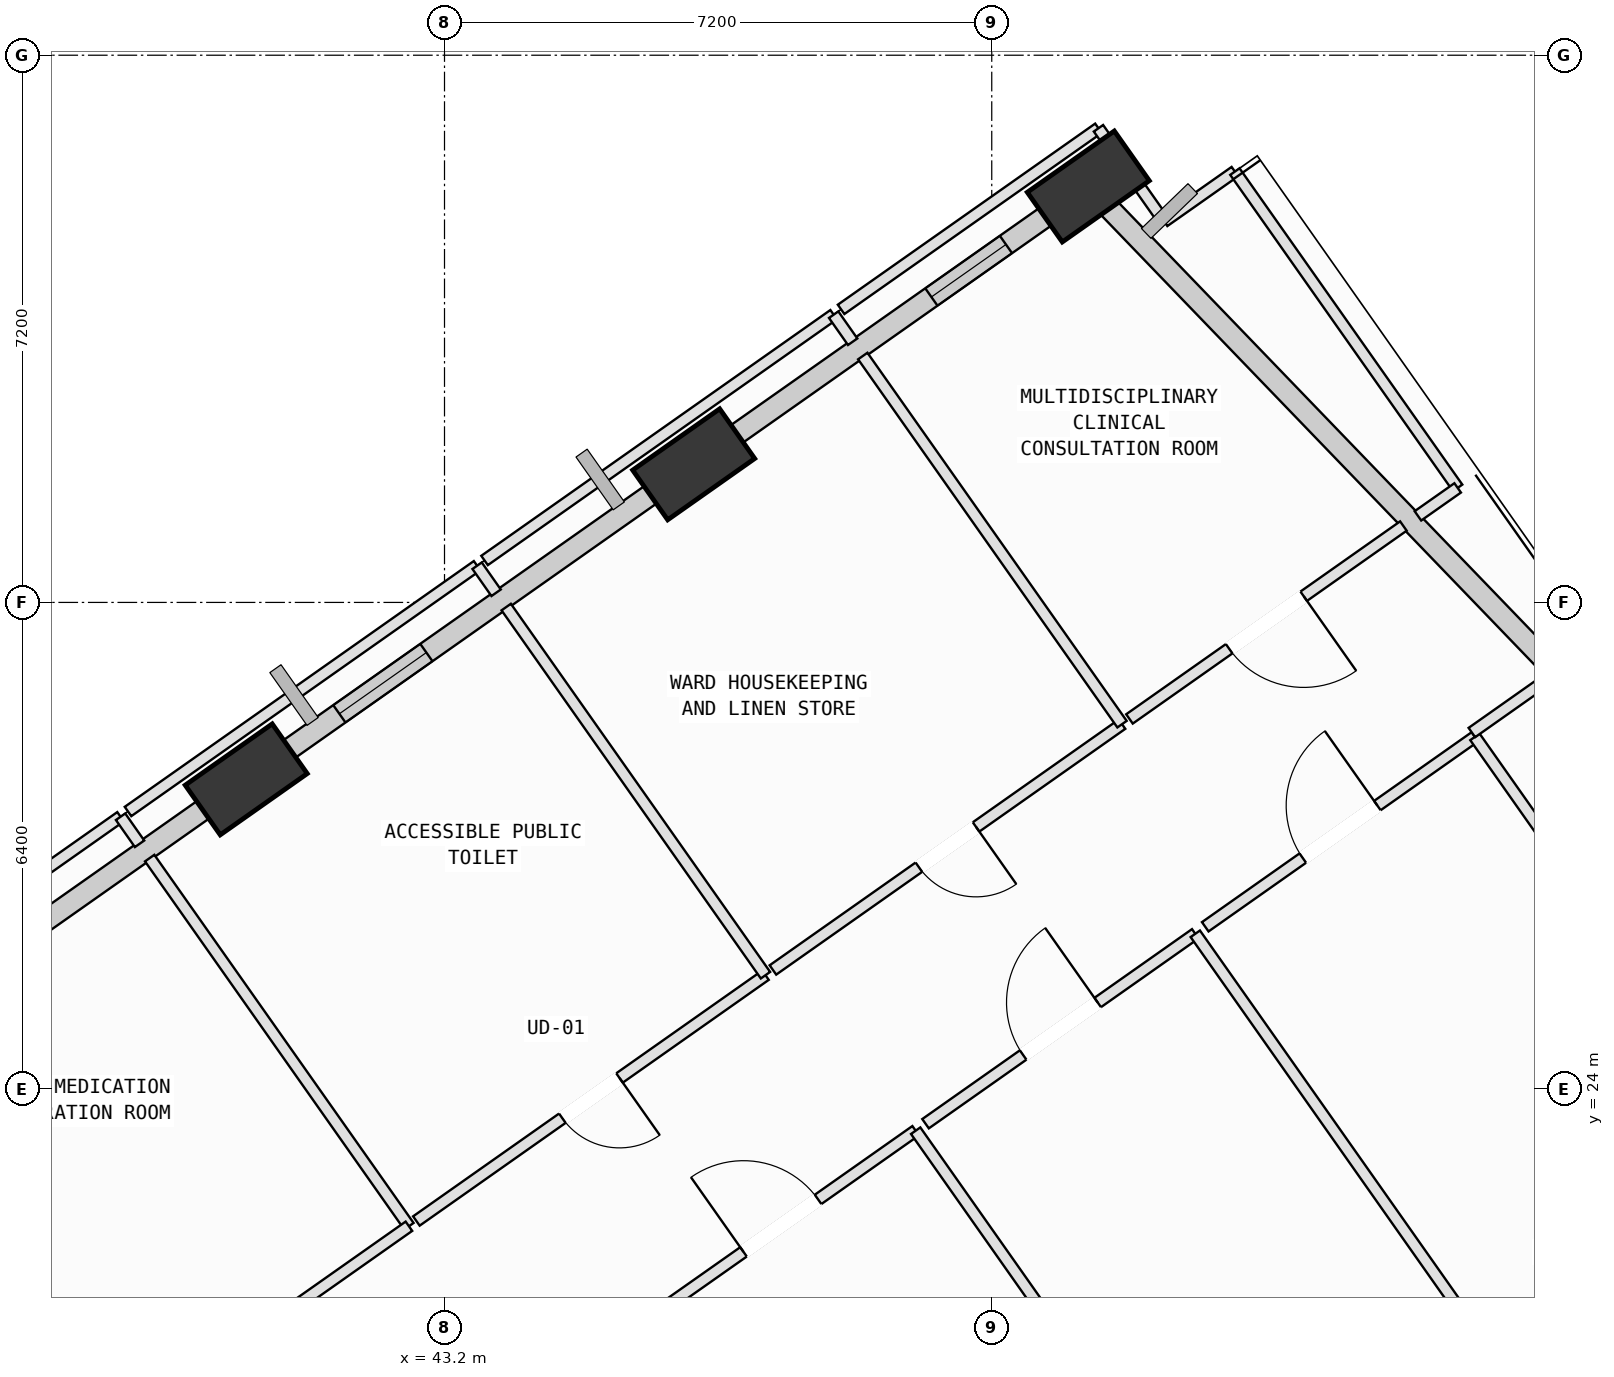
"""IFC4 building model, lengths in metres.
Left out: names, types, materials, properties, quantities, classifications, styles, units other than length and angle.
Written with IfcOpenShell. Run it as: python <this file> out.ifc"""

import sys

from ifc_helpers import new_model, si_unit, direction, frame, frame_2d, origin, origin_2d, place, context, subcontext, project, spatial, rectangle, extrude, element, fill, save


model = new_model("IFC4")
c1 = context("Model", 3, precision=1e-05, world=origin(), true_north=direction((0.0, 1.0)))
c2 = subcontext(c1, "Body", "Model", "MODEL_VIEW")
j1 = project(units=[si_unit("LENGTHUNIT", "METRE"), si_unit("PLANEANGLEUNIT", "RADIAN")], contexts=[c1])
p1 = place(None, origin())
s1 = spatial("IfcSite", under=j1, at=p1, CompositionType="ELEMENT")
p2 = place(p1, origin())
s2 = spatial("IfcBuilding", under=s1, at=p2, CompositionType="ELEMENT")
p3 = place(p2, frame((0.0, 0.0, 173.8)))
s3 = spatial("IfcBuildingStorey", under=s2, at=p3, CompositionType="ELEMENT", Elevation=173.8)
p4 = place(p3, frame((51.67, 35.873, 0.002), z_axis=(-0.046372709231, 0.074245020029, 0.996161256444), x_axis=(-0.389675727711, -0.919572177805, 0.05039679592)))
e1 = element("IfcColumn", 1, at=p4, inside=s3, PredefinedType="COLUMN", context=c2, shape_type="SweptSolid", body=[
    extrude(rectangle(XDim=1.4, YDim=0.8, at=origin_2d()), origin(), (0.0, 0.0, 1.0), 4.012),
])
p5 = place(p3, frame((46.478, 32.217, 0.002), z_axis=(-0.031097493858, 0.053048665992, 0.998107601871), x_axis=(-0.414781591136, -0.90923206001, 0.035401874319)))
e2 = element("IfcColumn", 2, at=p5, inside=s3, PredefinedType="COLUMN", context=c2, shape_type="SweptSolid", body=[
    extrude(rectangle(XDim=1.4, YDim=0.8, at=origin_2d()), origin(), (0.0, 0.0, 1.0), 4.004),
])
p6 = place(p3, frame((40.591, 28.072, 0.002), z_axis=(-0.013799535315, 0.028820268446, 0.999489352095), x_axis=(-0.488965468419, -0.872109136637, 0.018396317223)))
e3 = element("IfcColumn", 3, at=p6, inside=s3, PredefinedType="COLUMN", context=c2, shape_type="SweptSolid", body=[
    extrude(rectangle(XDim=1.4, YDim=0.8, at=origin_2d()), origin(), (0.0, 0.0, 1.0), 3.998),
])
p7 = place(p3, frame((51.895, 35.64, 0.0), z_axis=(0.0, 0.0, 1.0), x_axis=(0.693919284299, -0.720052794508, 0.0)))
e4 = element("IfcWall", 4, at=p7, inside=s3, PredefinedType="SOLIDWALL", context=c2, shape_type="SweptSolid", body=[
    extrude(rectangle(XDim=8.838, YDim=0.28, at=frame_2d((4.419, 0.0))), origin(), (0.0, 0.0, 1.0), 3.265),
])
p8 = place(p3, frame((46.88, 32.5, 0.0), z_axis=(0.0, 0.0, 1.0), x_axis=(0.817637087574, 0.575733960283, 0.0)))
e5 = element("IfcWall", 5, at=p8, inside=s3, PredefinedType="SOLIDWALL", context=c2, shape_type="SweptSolid", body=[
    extrude(rectangle(XDim=5.405, YDim=0.28, at=frame_2d((2.702, 0.0))), origin(), (0.0, 0.0, 1.0), 3.265),
])
p9 = place(p8, frame((3.334, 0.0, 0.75)))
e6 = element("IfcOpeningElement", 6, at=p9, cuts=e5, PredefinedType="OPENING", context=c2, shape_type="SweptSolid", body=[
    extrude(rectangle(XDim=1.2, YDim=1.75, at=frame_2d((0.6, 0.875))), frame((0.0, 0.15, 0.0), z_axis=(0.0, -1.0, 0.0), x_axis=(1.0, 0.0, 0.0)), (0.0, 0.0, 1.0), 0.3),
])
p10 = place(p3, frame((41.002, 28.361, 0.0), z_axis=(0.0, 0.0, 1.0), x_axis=(0.817646454024, 0.575720658151, 0.0)))
e7 = element("IfcWall", 7, at=p10, inside=s3, PredefinedType="SOLIDWALL", context=c2, shape_type="SweptSolid", body=[
    extrude(rectangle(XDim=6.227, YDim=0.28, at=frame_2d((3.113, 0.0))), origin(), (0.0, 0.0, 1.0), 3.065),
])
p11 = place(p10, frame((0.996, 0.0, 0.75)))
e8 = element("IfcOpeningElement", 8, at=p11, cuts=e7, PredefinedType="OPENING", context=c2, shape_type="SweptSolid", body=[
    extrude(rectangle(XDim=1.4, YDim=1.85, at=frame_2d((0.7, 0.925))), frame((0.0, 0.15, 0.0), z_axis=(0.0, -1.0, 0.0), x_axis=(1.0, 0.0, 0.0)), (0.0, 0.0, 1.0), 0.3),
])
p12 = place(p3, frame((35.119, 24.219, 0.0), z_axis=(0.0, 0.0, 1.0), x_axis=(0.817635088969, 0.575736798622, 0.0)))
e9 = element("IfcWall", 9, at=p12, inside=s3, PredefinedType="SOLIDWALL", context=c2, shape_type="SweptSolid", body=[
    extrude(rectangle(XDim=6.211, YDim=0.28, at=frame_2d((3.105, 0.0))), origin(), (0.0, 0.0, 1.0), 3.265),
])
p13 = place(p12, frame((1.524, 0.0, 0.75)))
e10 = element("IfcOpeningElement", 10, at=p13, cuts=e9, PredefinedType="OPENING", context=c2, shape_type="SweptSolid", body=[
    extrude(rectangle(XDim=1.8, YDim=2.05, at=frame_2d((0.9, 1.025))), frame((0.0, 0.15, 0.0), z_axis=(0.0, -1.0, 0.0), x_axis=(1.0, 0.0, 0.0)), (0.0, 0.0, 1.0), 0.3),
])
p14 = place(p3, frame((45.85, 20.951, 0.0), z_axis=(0.0, 0.0, 1.0), x_axis=(0.817727963856, 0.575604879346, 0.0)))
e11 = element("IfcWall", 11, at=p14, inside=s3, PredefinedType="PARTITIONING", context=c2, shape_type="SweptSolid", body=[
    extrude(rectangle(XDim=4.34, YDim=0.15, at=frame_2d((2.17, 0.0))), origin(), (0.0, 0.0, 1.0), 3.78),
])
p15 = place(p14, frame((1.57, 0.0, 0.0)))
e12 = element("IfcOpeningElement", 12, at=p15, cuts=e11, PredefinedType="OPENING", context=c2, shape_type="SweptSolid", body=[
    extrude(rectangle(XDim=1.2, YDim=2.15, at=frame_2d((0.6, 1.075))), frame((0.0, 0.085, 0.0), z_axis=(0.0, -1.0, 0.0), x_axis=(1.0, 0.0, 0.0)), (0.0, 0.0, 1.0), 0.17),
])
p16 = place(p3, frame((49.399, 23.449, 0.0), z_axis=(0.0, 0.0, 1.0), x_axis=(0.575704672979, -0.817657709259, 0.0)))
e13 = element("IfcWall", 13, at=p16, inside=s3, PredefinedType="PARTITIONING", context=c2, shape_type="SweptSolid", body=[
    extrude(rectangle(XDim=12.279, YDim=0.15, at=frame_2d((6.14, 0.0))), origin(), (0.0, 0.0, 1.0), 3.78),
])
p17 = place(p3, frame((49.529, 23.541, 0.0), z_axis=(0.0, 0.0, 1.0), x_axis=(0.81762204879, 0.575755317241, 0.0)))
e14 = element("IfcWall", 14, at=p17, inside=s3, PredefinedType="PARTITIONING", context=c2, shape_type="SweptSolid", body=[
    extrude(rectangle(XDim=4.34, YDim=0.15, at=frame_2d((2.17, 0.0))), origin(), (0.0, 0.0, 1.0), 3.065),
])
p18 = place(p17, frame((1.57, 0.0, 0.0)))
e15 = element("IfcOpeningElement", 15, at=p18, cuts=e14, PredefinedType="OPENING", context=c2, shape_type="SweptSolid", body=[
    extrude(rectangle(XDim=1.2, YDim=2.15, at=frame_2d((0.6, 1.075))), frame((0.0, 0.085, 0.0), z_axis=(0.0, -1.0, 0.0), x_axis=(1.0, 0.0, 0.0)), (0.0, 0.0, 1.0), 0.17),
])
p19 = place(p3, frame((53.078, 26.04, 0.0), z_axis=(0.0, 0.0, 1.0), x_axis=(0.575696572392, -0.817663412742, 0.0)))
e16 = element("IfcWall", 16, at=p19, inside=s3, PredefinedType="PARTITIONING", context=c2, shape_type="SweptSolid", body=[
    extrude(rectangle(XDim=11.935, YDim=0.15, at=frame_2d((5.968, 0.0))), origin(), (0.0, 0.0, 1.0), 3.78),
])
p20 = place(p3, frame((53.209, 26.132, 0.0), z_axis=(0.0, 0.0, 1.0), x_axis=(0.817566099481, 0.575834761872, 0.0)))
e17 = element("IfcWall", 17, at=p20, inside=s3, PredefinedType="PARTITIONING", context=c2, shape_type="SweptSolid", body=[
    extrude(rectangle(XDim=4.34, YDim=0.15, at=frame_2d((2.17, 0.0))), origin(), (0.0, 0.0, 1.0), 3.065),
])
p21 = place(p20, frame((1.57, 0.0, 0.0)))
e18 = element("IfcOpeningElement", 18, at=p21, cuts=e17, PredefinedType="OPENING", context=c2, shape_type="SweptSolid", body=[
    extrude(rectangle(XDim=1.2, YDim=2.15, at=frame_2d((0.6, 1.075))), frame((0.0, 0.085, 0.0), z_axis=(0.0, -1.0, 0.0), x_axis=(1.0, 0.0, 0.0)), (0.0, 0.0, 1.0), 0.17),
])
p22 = place(p3, frame((56.757, 28.631, 0.0), z_axis=(0.0, 0.0, 1.0), x_axis=(0.575730217861, -0.817639722764, 0.0)))
e19 = element("IfcWall", 19, at=p22, inside=s3, PredefinedType="PARTITIONING", context=c2, shape_type="SweptSolid", body=[
    extrude(rectangle(XDim=9.831, YDim=0.15, at=frame_2d((4.916, 0.0))), origin(), (0.0, 0.0, 1.0), 3.78),
])
p23 = place(p22, frame((4.485, 0.0, 0.0)))
e20 = element("IfcOpeningElement", 20, at=p23, cuts=e19, PredefinedType="OPENING", context=c2, shape_type="SweptSolid", body=[
    extrude(rectangle(XDim=0.86, YDim=2.06, at=frame_2d((0.43, 1.03))), frame((0.0, 0.085, 0.0), z_axis=(0.0, -1.0, 0.0), x_axis=(1.0, 0.0, 0.0)), (0.0, 0.0, 1.0), 0.17),
])
p24 = place(p3, frame((34.345, 24.346, 0.0), z_axis=(0.0, 0.0, 1.0), x_axis=(0.817638200952, 0.5757323791, 0.0)))
e21 = element("IfcWall", 21, at=p24, inside=s3, PredefinedType="PARTITIONING", context=c2, shape_type="SweptSolid", body=[
    extrude(rectangle(XDim=5.617, YDim=0.15, at=frame_2d((2.809, 0.0))), origin(), (0.0, 0.0, 1.0), 3.78),
])
p25 = place(p3, frame((38.938, 27.58, 0.0), z_axis=(0.0, 0.0, 1.0), x_axis=(0.574742398175, -0.818334391151, 0.0)))
e22 = element("IfcWall", 22, at=p25, inside=s3, PredefinedType="PARTITIONING", context=c2, shape_type="SweptSolid", body=[
    extrude(rectangle(XDim=0.435, YDim=0.15, at=frame_2d((0.218, 0.0))), origin(), (0.0, 0.0, 1.0), 3.78),
])
p26 = place(p3, frame((39.321, 27.036, 0.0), z_axis=(0.0, 0.0, 1.0), x_axis=(0.575736327122, -0.817635420974, 0.0)))
e23 = element("IfcWall", 23, at=p26, inside=s3, PredefinedType="PARTITIONING", context=c2, shape_type="SweptSolid", body=[
    extrude(rectangle(XDim=5.924, YDim=0.15, at=frame_2d((2.962, 0.0))), origin(), (0.0, 0.0, 1.0), 3.78),
])
p27 = place(p3, frame((42.732, 22.192, 0.0), z_axis=(0.0, 0.0, 1.0), x_axis=(-0.81760379004, -0.575781245363, 0.0)))
e24 = element("IfcWall", 24, at=p27, inside=s3, PredefinedType="PARTITIONING", context=c2, shape_type="SweptSolid", body=[
    extrude(rectangle(XDim=2.626, YDim=0.15, at=frame_2d((1.313, 0.0))), origin(), (0.0, 0.0, 1.0), 3.78),
])
p28 = place(p3, frame((47.423, 25.495, 0.0), z_axis=(0.0, 0.0, 1.0), x_axis=(-0.817638200952, -0.5757323791, 0.0)))
e25 = element("IfcWall", 25, at=p28, inside=s3, PredefinedType="PARTITIONING", context=c2, shape_type="SweptSolid", body=[
    extrude(rectangle(XDim=5.617, YDim=0.15, at=frame_2d((2.809, 0.0))), origin(), (0.0, 0.0, 1.0), 3.78),
])
p29 = place(p28, frame((2.349, 0.0, 0.0)))
e26 = element("IfcOpeningElement", 26, at=p29, cuts=e25, PredefinedType="OPENING", context=c2, shape_type="SweptSolid", body=[
    extrude(rectangle(XDim=0.92, YDim=2.1, at=frame_2d((0.46, 1.05))), frame((0.0, 0.085, 0.0), z_axis=(0.0, -1.0, 0.0), x_axis=(1.0, 0.0, 0.0)), (0.0, 0.0, 1.0), 0.17),
])
p30 = place(p3, frame((39.036, 27.649, 0.0), z_axis=(0.0, 0.0, 1.0), x_axis=(0.817638200952, 0.5757323791, 0.0)))
e27 = element("IfcWall", 27, at=p30, inside=s3, PredefinedType="PARTITIONING", context=c2, shape_type="SweptSolid", body=[
    extrude(rectangle(XDim=5.617, YDim=0.15, at=frame_2d((2.809, 0.0))), origin(), (0.0, 0.0, 1.0), 3.265),
])
p31 = place(p3, frame((43.629, 30.883, 0.0), z_axis=(0.0, 0.0, 1.0), x_axis=(0.574742398175, -0.818334391151, 0.0)))
e28 = element("IfcWall", 28, at=p31, inside=s3, PredefinedType="PARTITIONING", context=c2, shape_type="SweptSolid", body=[
    extrude(rectangle(XDim=0.435, YDim=0.15, at=frame_2d((0.218, 0.0))), origin(), (0.0, 0.0, 1.0), 3.78),
])
p32 = place(p3, frame((44.012, 30.339, 0.0), z_axis=(0.0, 0.0, 1.0), x_axis=(0.575763875757, -0.817616021965, 0.0)))
e29 = element("IfcWall", 29, at=p32, inside=s3, PredefinedType="PARTITIONING", context=c2, shape_type="SweptSolid", body=[
    extrude(rectangle(XDim=5.925, YDim=0.15, at=frame_2d((2.962, 0.0))), origin(), (0.0, 0.0, 1.0), 3.78),
])
p33 = place(p3, frame((52.114, 28.798, 0.0), z_axis=(0.0, 0.0, 1.0), x_axis=(-0.817638200952, -0.5757323791, 0.0)))
e30 = element("IfcWall", 30, at=p33, inside=s3, PredefinedType="PARTITIONING", context=c2, shape_type="SweptSolid", body=[
    extrude(rectangle(XDim=5.617, YDim=0.15, at=frame_2d((2.809, 0.0))), origin(), (0.0, 0.0, 1.0), 3.78),
])
p34 = place(p33, frame((2.349, 0.0, 0.0)))
e31 = element("IfcOpeningElement", 31, at=p34, cuts=e30, PredefinedType="OPENING", context=c2, shape_type="SweptSolid", body=[
    extrude(rectangle(XDim=0.92, YDim=2.1, at=frame_2d((0.46, 1.05))), frame((0.0, 0.085, 0.0), z_axis=(0.0, -1.0, 0.0), x_axis=(1.0, 0.0, 0.0)), (0.0, 0.0, 1.0), 0.17),
])
p35 = place(p3, frame((43.727, 30.952, 0.0), z_axis=(0.0, 0.0, 1.0), x_axis=(0.817638200952, 0.5757323791, 0.0)))
e32 = element("IfcWall", 32, at=p35, inside=s3, PredefinedType="PARTITIONING", context=c2, shape_type="SweptSolid", body=[
    extrude(rectangle(XDim=5.617, YDim=0.15, at=frame_2d((2.809, 0.0))), origin(), (0.0, 0.0, 1.0), 3.065),
])
p36 = place(p3, frame((48.32, 34.186, 0.0), z_axis=(0.0, 0.0, 1.0), x_axis=(0.574742398175, -0.818334391151, 0.0)))
e33 = element("IfcWall", 33, at=p36, inside=s3, PredefinedType="PARTITIONING", context=c2, shape_type="SweptSolid", body=[
    extrude(rectangle(XDim=0.435, YDim=0.15, at=frame_2d((0.218, 0.0))), origin(), (0.0, 0.0, 1.0), 3.78),
])
p37 = place(p3, frame((48.703, 33.642, 0.0), z_axis=(0.0, 0.0, 1.0), x_axis=(0.575763875757, -0.817616021965, 0.0)))
e34 = element("IfcWall", 34, at=p37, inside=s3, PredefinedType="PARTITIONING", context=c2, shape_type="SweptSolid", body=[
    extrude(rectangle(XDim=5.925, YDim=0.15, at=frame_2d((2.962, 0.0))), origin(), (0.0, 0.0, 1.0), 3.78),
])
p38 = place(p3, frame((52.667, 35.413, 0.0), z_axis=(0.0, 0.0, 1.0), x_axis=(0.817780283256, 0.575530545078, 0.0)))
e35 = element("IfcWall", 35, at=p38, inside=s3, PredefinedType="PARTITIONING", context=c2, shape_type="SweptSolid", body=[
    extrude(rectangle(XDim=1.14, YDim=0.15, at=frame_2d((0.57, 0.0))), origin(), (0.0, 0.0, 1.0), 3.78),
])
p39 = place(p3, frame((53.599, 36.069, 0.0), z_axis=(0.0, 0.0, 1.0), x_axis=(0.575758299288, -0.817619948877, 0.0)))
e36 = element("IfcWall", 36, at=p39, inside=s3, PredefinedType="PARTITIONING", context=c2, shape_type="SweptSolid", body=[
    extrude(rectangle(XDim=5.091, YDim=0.15, at=frame_2d((2.545, 0.0))), origin(), (0.0, 0.0, 1.0), 3.78),
])
p40 = place(p3, frame((56.53, 31.907, 0.0), z_axis=(0.0, 0.0, 1.0), x_axis=(-0.817866315649, -0.575408280898, 0.0)))
e37 = element("IfcWall", 37, at=p40, inside=s3, PredefinedType="PARTITIONING", context=c2, shape_type="SweptSolid", body=[
    extrude(rectangle(XDim=0.639, YDim=0.15, at=frame_2d((0.32, 0.0))), origin(), (0.0, 0.0, 1.0), 3.78),
])
p41 = place(p3, frame((55.816, 31.405, 0.0), z_axis=(0.0, 0.0, 1.0), x_axis=(-0.817599763691, -0.575786962697, 0.0)))
e38 = element("IfcWall", 38, at=p41, inside=s3, PredefinedType="PARTITIONING", context=c2, shape_type="SweptSolid", body=[
    extrude(rectangle(XDim=4.408, YDim=0.15, at=frame_2d((2.204, 0.0))), origin(), (0.0, 0.0, 1.0), 3.78),
])
p42 = place(p41, frame((1.604, 0.0, 0.0)))
e39 = element("IfcOpeningElement", 39, at=p42, cuts=e38, PredefinedType="OPENING", context=c2, shape_type="SweptSolid", body=[
    extrude(rectangle(XDim=1.2, YDim=2.15, at=frame_2d((0.6, 1.075))), frame((0.0, 0.085, 0.0), z_axis=(0.0, -1.0, 0.0), x_axis=(1.0, 0.0, 0.0)), (0.0, 0.0, 1.0), 0.17),
])
p43 = place(p3, frame((48.418, 34.256, 0.0), z_axis=(0.0, 0.0, 1.0), x_axis=(0.817797168592, 0.575506551695, 0.0)))
e40 = element("IfcWall", 40, at=p43, inside=s3, PredefinedType="PARTITIONING", context=c2, shape_type="SweptSolid", body=[
    extrude(rectangle(XDim=4.14, YDim=0.15, at=frame_2d((2.07, 0.0))), origin(), (0.0, 0.0, 1.0), 3.265),
])
p44 = place(p3, frame((51.804, 36.639, 0.0), z_axis=(0.0, 0.0, 1.0), x_axis=(0.575678952073, -0.817675818488, 0.0)))
e41 = element("IfcWall", 41, at=p44, inside=s3, PredefinedType="PARTITIONING", context=c2, shape_type="SweptSolid", body=[
    extrude(rectangle(XDim=1.499, YDim=0.15, at=frame_2d((0.75, 0.0))), origin(), (0.0, 0.0, 1.0), 3.265),
])
p45 = place(p3, frame((56.717, 28.688, 0.0), z_axis=(0.0, 0.0, 1.0), x_axis=(0.817394747744, 0.576077968995, 0.0)))
e42 = element("IfcWall", 42, at=p45, inside=s3, PredefinedType="PARTITIONING", context=c2, shape_type="SweptSolid", body=[
    extrude(rectangle(XDim=1.251, YDim=0.15, at=frame_2d((0.626, 0.0))), origin(), (0.0, 0.0, 1.0), 3.065),
])
p46 = place(p9, origin())
e43 = element("IfcWindow", 43, at=p46, inside=s3, PartitioningType="SINGLE_PANEL", PredefinedType="WINDOW", context=c2, shape_type="SweptSolid", body=[
    extrude(rectangle(XDim=1.2, YDim=1.75, at=frame_2d((0.6, 0.875))), frame((0.0, 0.03, 0.0), z_axis=(0.0, -1.0, 0.0), x_axis=(1.0, 0.0, 0.0)), (0.0, 0.0, 1.0), 0.06),
])
fill(e6, e43)
p47 = place(p11, origin())
e44 = element("IfcWindow", 44, at=p47, inside=s3, PartitioningType="SINGLE_PANEL", PredefinedType="WINDOW", context=c2, shape_type="SweptSolid", body=[
    extrude(rectangle(XDim=1.4, YDim=1.85, at=frame_2d((0.7, 0.925))), frame((0.0, 0.03, 0.0), z_axis=(0.0, -1.0, 0.0), x_axis=(1.0, 0.0, 0.0)), (0.0, 0.0, 1.0), 0.06),
])
fill(e8, e44)
p48 = place(p15, origin())
e45 = element("IfcDoor", 45, at=p48, inside=s3, OperationType="SINGLE_SWING_LEFT", PredefinedType="DOOR", context=c2, shape_type="SweptSolid", body=[
    extrude(rectangle(XDim=1.2, YDim=2.15, at=frame_2d((0.6, 1.075))), frame((0.0, 0.025, 0.0), z_axis=(0.0, -1.0, 0.0), x_axis=(1.0, 0.0, 0.0)), (0.0, 0.0, 1.0), 0.05),
])
fill(e12, e45)
p49 = place(p18, origin())
e46 = element("IfcDoor", 46, at=p49, inside=s3, OperationType="SINGLE_SWING_RIGHT", PredefinedType="DOOR", context=c2, shape_type="SweptSolid", body=[
    extrude(rectangle(XDim=1.2, YDim=2.15, at=frame_2d((0.6, 1.075))), frame((0.0, 0.025, 0.0), z_axis=(0.0, -1.0, 0.0), x_axis=(1.0, 0.0, 0.0)), (0.0, 0.0, 1.0), 0.05),
])
fill(e15, e46)
p50 = place(p21, origin())
e47 = element("IfcDoor", 47, at=p50, inside=s3, OperationType="SINGLE_SWING_RIGHT", PredefinedType="DOOR", context=c2, shape_type="SweptSolid", body=[
    extrude(rectangle(XDim=1.2, YDim=2.15, at=frame_2d((0.6, 1.075))), frame((0.0, 0.025, 0.0), z_axis=(0.0, -1.0, 0.0), x_axis=(1.0, 0.0, 0.0)), (0.0, 0.0, 1.0), 0.05),
])
fill(e18, e47)
p51 = place(p29, origin())
e48 = element("IfcDoor", 48, at=p51, inside=s3, OperationType="SINGLE_SWING_LEFT", PredefinedType="DOOR", context=c2, shape_type="SweptSolid", body=[
    extrude(rectangle(XDim=0.92, YDim=2.1, at=frame_2d((0.46, 1.05))), frame((0.0, 0.025, 0.0), z_axis=(0.0, -1.0, 0.0), x_axis=(1.0, 0.0, 0.0)), (0.0, 0.0, 1.0), 0.05),
])
fill(e26, e48)
p52 = place(p34, origin())
e49 = element("IfcDoor", 49, at=p52, inside=s3, OperationType="SINGLE_SWING_LEFT", PredefinedType="DOOR", context=c2, shape_type="SweptSolid", body=[
    extrude(rectangle(XDim=0.92, YDim=2.1, at=frame_2d((0.46, 1.05))), frame((0.0, 0.025, 0.0), z_axis=(0.0, -1.0, 0.0), x_axis=(1.0, 0.0, 0.0)), (0.0, 0.0, 1.0), 0.05),
])
fill(e31, e49)
p53 = place(p42, origin())
e50 = element("IfcDoor", 50, at=p53, inside=s3, OperationType="SINGLE_SWING_LEFT", PredefinedType="DOOR", context=c2, shape_type="SweptSolid", body=[
    extrude(rectangle(XDim=1.2, YDim=2.15, at=frame_2d((0.6, 1.075))), frame((0.0, 0.025, 0.0), z_axis=(0.0, -1.0, 0.0), x_axis=(1.0, 0.0, 0.0)), (0.0, 0.0, 1.0), 0.05),
])
fill(e39, e50)
save(model, sys.argv[1])
